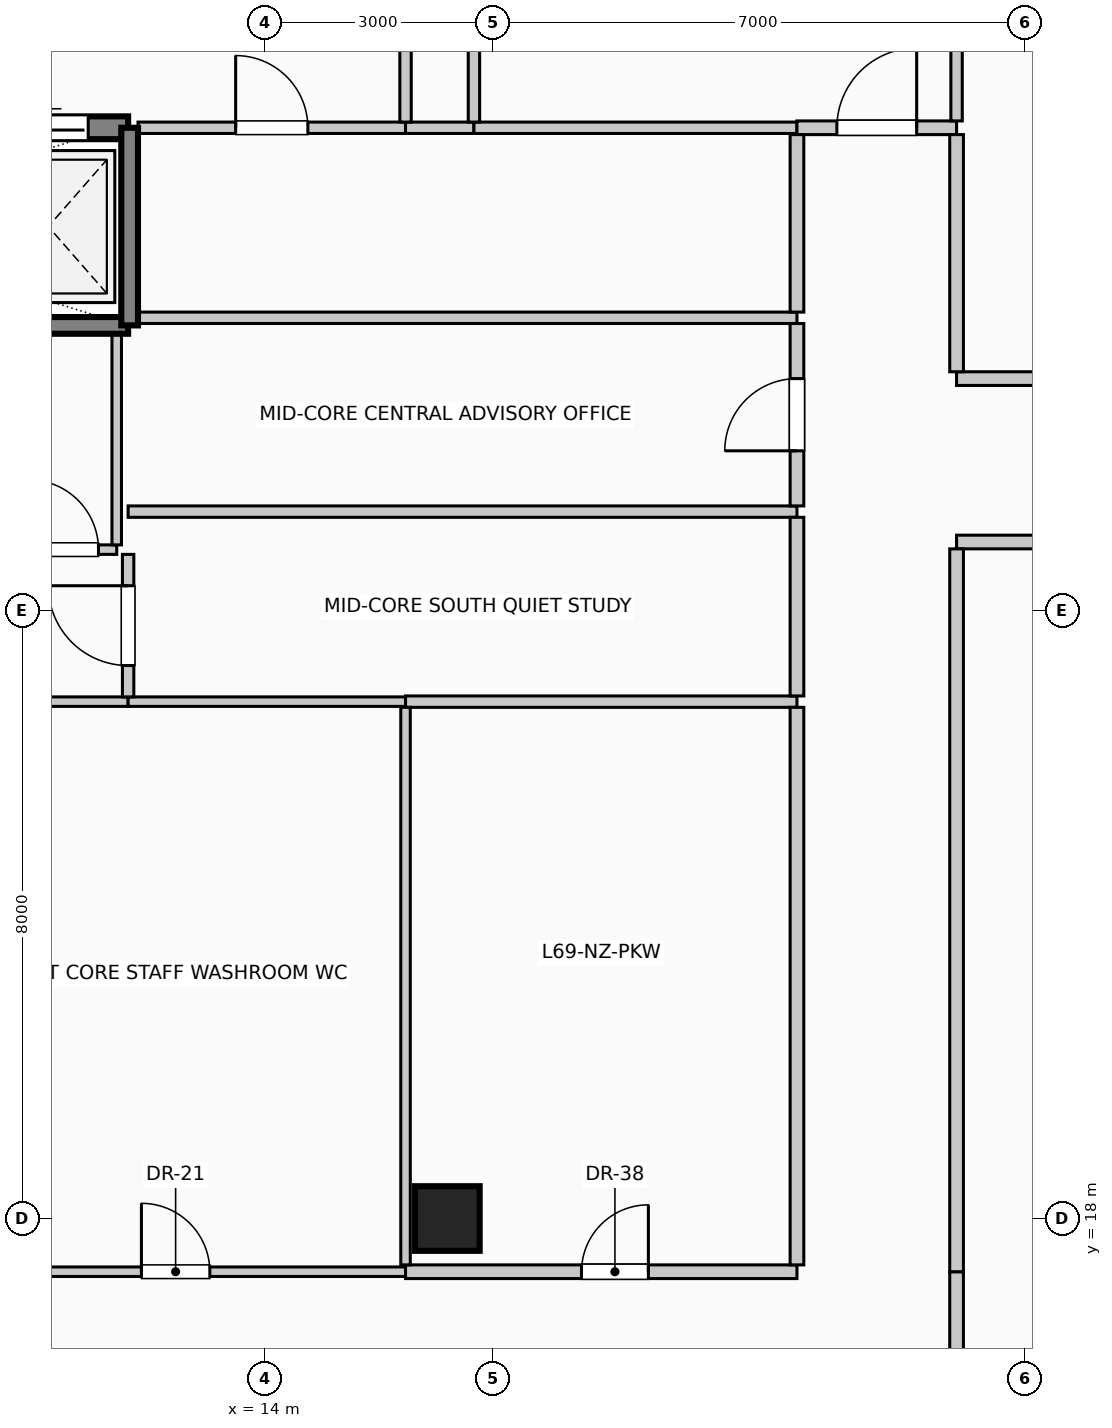
"""IFC4 building model, lengths in metres.
Left out: names, types, materials, properties, quantities, classifications, styles, units other than length and angle.
Written with IfcOpenShell. Run it as: python <this file> out.ifc"""

import sys

from ifc_helpers import new_model, si_unit, direction, frame, frame_2d, origin, origin_2d, place, context, subcontext, project, spatial, rectangle, circle, extrude, element, fill, save


model = new_model("IFC4")
c1 = context("Model", 3, precision=1e-05, world=origin(), true_north=direction((0.0, 1.0)))
c2 = subcontext(c1, "Body", "Model", "MODEL_VIEW")
j1 = project(units=[si_unit("LENGTHUNIT", "METRE"), si_unit("PLANEANGLEUNIT", "RADIAN")], contexts=[c1])
p1 = place(None, origin())
s1 = spatial("IfcSite", under=j1, at=p1, CompositionType="ELEMENT")
p2 = place(p1, origin())
s2 = spatial("IfcBuilding", under=s1, at=p2, CompositionType="ELEMENT")
p3 = place(p2, frame((0.0, 0.0, 285.0)))
s3 = spatial("IfcBuildingStorey", under=s2, at=p3, CompositionType="ELEMENT", Elevation=285.0)
p4 = place(p3, frame((16.4, 18.0, 0.0), z_axis=(0.0, 0.0, 1.0), x_axis=(1.0, 0.0, 0.0)))
e1 = element("IfcColumn", 1, at=p4, inside=s3, PredefinedType="COLUMN", context=c2, shape_type="SweptSolid", body=[
    extrude(circle(Radius=0.425, at=origin_2d()), origin(), (0.0, 0.0, 1.0), 4.0),
])
p5 = place(p3, frame((10.05, 32.35, 0.0), z_axis=(0.0, 0.0, 1.0), x_axis=(1.0, 0.0, 0.0)))
e2 = element("IfcWall", 2, at=p5, inside=s3, PredefinedType="SOLIDWALL", context=c2, shape_type="SweptSolid", body=[
    extrude(rectangle(XDim=2.15, YDim=0.3, at=frame_2d((1.075, 0.0))), origin(), (0.0, 0.0, 1.0), 4.0),
])
p6 = place(p5, frame((0.525, 0.0, 0.0)))
e3 = element("IfcOpeningElement", 3, at=p6, cuts=e2, PredefinedType="OPENING", context=c2, shape_type="SweptSolid", body=[
    extrude(rectangle(XDim=1.1, YDim=2.2, at=frame_2d((0.55, 1.1))), frame((0.0, 0.16, 0.0), z_axis=(0.0, -1.0, 0.0), x_axis=(1.0, 0.0, 0.0)), (0.0, 0.0, 1.0), 0.32),
])
p7 = place(p3, frame((3.55, 29.75, 0.0), z_axis=(0.0, 0.0, 1.0), x_axis=(1.0, 0.0, 0.0)))
e4 = element("IfcWall", 4, at=p7, inside=s3, PredefinedType="SOLIDWALL", context=c2, shape_type="SweptSolid", body=[
    extrude(rectangle(XDim=8.65, YDim=0.22, at=frame_2d((4.325, 0.0))), origin(), (0.0, 0.0, 1.0), 4.0),
])
p8 = place(p3, frame((12.22, 29.75, 0.0), z_axis=(0.0, 0.0, 1.0), x_axis=(0.0, 1.0, 0.0)))
e5 = element("IfcWall", 5, at=p8, inside=s3, PredefinedType="SOLIDWALL", context=c2, shape_type="SweptSolid", body=[
    extrude(rectangle(XDim=2.6, YDim=0.22, at=frame_2d((1.3, 0.0))), origin(), (0.0, 0.0, 1.0), 4.0),
])
p9 = place(p3, frame((9.8, 17.3, 0.0), z_axis=(0.0, 0.0, 1.0), x_axis=(1.0, 0.0, 0.0)))
e6 = element("IfcWall", 6, at=p9, inside=s3, PredefinedType="PARTITIONING", context=c2, shape_type="SweptSolid", body=[
    extrude(rectangle(XDim=6.05, YDim=0.125, at=frame_2d((3.025, 0.0))), origin(), (0.0, 0.0, 1.0), 3.775),
])
p10 = place(p9, frame((2.575, 0.0, 0.0)))
e7 = element("IfcOpeningElement", 7, at=p10, cuts=e6, PredefinedType="OPENING", context=c2, shape_type="SweptSolid", body=[
    extrude(rectangle(XDim=0.9, YDim=2.1, at=frame_2d((0.45, 1.05))), frame((0.0, 0.073, 0.0), z_axis=(0.0, -1.0, 0.0), x_axis=(1.0, 0.0, 0.0)), (0.0, 0.0, 1.0), 0.145),
])
p11 = place(p3, frame((15.85, 17.3, 0.0), z_axis=(0.0, 0.0, 1.0), x_axis=(1.0, 0.0, 0.0)))
e8 = element("IfcWall", 8, at=p11, inside=s3, PredefinedType="PARTITIONING", context=c2, shape_type="SweptSolid", body=[
    extrude(rectangle(XDim=5.15, YDim=0.18, at=frame_2d((2.575, 0.0))), origin(), (0.0, 0.0, 1.0), 3.775),
])
p12 = place(p11, frame((2.315, 0.0, 0.0)))
e9 = element("IfcOpeningElement", 9, at=p12, cuts=e8, PredefinedType="OPENING", context=c2, shape_type="SweptSolid", body=[
    extrude(rectangle(XDim=0.88, YDim=2.1, at=frame_2d((0.44, 1.05))), frame((0.0, 0.1, 0.0), z_axis=(0.0, -1.0, 0.0), x_axis=(1.0, 0.0, 0.0)), (0.0, 0.0, 1.0), 0.2),
])
p13 = place(p3, frame((9.8, 24.8, 0.0), z_axis=(0.0, 0.0, 1.0), x_axis=(1.0, 0.0, 0.0)))
e10 = element("IfcWall", 10, at=p13, inside=s3, PredefinedType="PARTITIONING", context=c2, shape_type="SweptSolid", body=[
    extrude(rectangle(XDim=2.4, YDim=0.125, at=frame_2d((1.2, 0.0))), origin(), (0.0, 0.0, 1.0), 3.775),
])
p14 = place(p3, frame((12.2, 24.8, 0.0), z_axis=(0.0, 0.0, 1.0), x_axis=(1.0, 0.0, 0.0)))
e11 = element("IfcWall", 11, at=p14, inside=s3, PredefinedType="PARTITIONING", context=c2, shape_type="SweptSolid", body=[
    extrude(rectangle(XDim=3.65, YDim=0.125, at=frame_2d((1.825, 0.0))), origin(), (0.0, 0.0, 1.0), 3.775),
])
p15 = place(p3, frame((15.85, 24.8, 0.0), z_axis=(0.0, 0.0, 1.0), x_axis=(1.0, 0.0, 0.0)))
e12 = element("IfcWall", 12, at=p15, inside=s3, PredefinedType="PARTITIONING", context=c2, shape_type="SweptSolid", body=[
    extrude(rectangle(XDim=5.15, YDim=0.15, at=frame_2d((2.575, 0.0))), origin(), (0.0, 0.0, 1.0), 3.775),
])
p16 = place(p3, frame((10.65, 26.8, 0.0), z_axis=(0.0, 0.0, 1.0), x_axis=(1.0, 0.0, 0.0)))
e13 = element("IfcWall", 13, at=p16, inside=s3, PredefinedType="PARTITIONING", context=c2, shape_type="SweptSolid", body=[
    extrude(rectangle(XDim=1.4, YDim=0.125, at=frame_2d((0.7, 0.0))), origin(), (0.0, 0.0, 1.0), 3.775),
])
p17 = place(p16, frame((0.24, 0.0, 0.0)))
e14 = element("IfcOpeningElement", 14, at=p17, cuts=e13, PredefinedType="OPENING", context=c2, shape_type="SweptSolid", body=[
    extrude(rectangle(XDim=0.92, YDim=2.1, at=frame_2d((0.46, 1.05))), frame((0.0, 0.073, 0.0), z_axis=(0.0, -1.0, 0.0), x_axis=(1.0, 0.0, 0.0)), (0.0, 0.0, 1.0), 0.145),
])
p18 = place(p3, frame((23.1, 26.9, 0.0), z_axis=(0.0, 0.0, 1.0), x_axis=(1.0, 0.0, 0.0)))
e15 = element("IfcWall", 15, at=p18, inside=s3, PredefinedType="PARTITIONING", context=c2, shape_type="SweptSolid", body=[
    extrude(rectangle(XDim=5.9, YDim=0.18, at=frame_2d((2.95, 0.0))), origin(), (0.0, 0.0, 1.0), 3.775),
])
p19 = place(p18, frame((2.51, 0.0, 0.0)))
e16 = element("IfcOpeningElement", 16, at=p19, cuts=e15, PredefinedType="OPENING", context=c2, shape_type="SweptSolid", body=[
    extrude(rectangle(XDim=0.88, YDim=2.1, at=frame_2d((0.44, 1.05))), frame((0.0, 0.1, 0.0), z_axis=(0.0, -1.0, 0.0), x_axis=(1.0, 0.0, 0.0)), (0.0, 0.0, 1.0), 0.2),
])
p20 = place(p3, frame((12.2, 27.3, 0.0), z_axis=(0.0, 0.0, 1.0), x_axis=(1.0, 0.0, 0.0)))
e17 = element("IfcWall", 17, at=p20, inside=s3, PredefinedType="PARTITIONING", context=c2, shape_type="SweptSolid", body=[
    extrude(rectangle(XDim=8.8, YDim=0.15, at=frame_2d((4.4, 0.0))), origin(), (0.0, 0.0, 1.0), 3.775),
])
p21 = place(p3, frame((23.1, 29.05, 0.0), z_axis=(0.0, 0.0, 1.0), x_axis=(1.0, 0.0, 0.0)))
e18 = element("IfcWall", 18, at=p21, inside=s3, PredefinedType="PARTITIONING", context=c2, shape_type="SweptSolid", body=[
    extrude(rectangle(XDim=5.24, YDim=0.18, at=frame_2d((2.62, 0.0))), origin(), (0.0, 0.0, 1.0), 3.775),
])
p22 = place(p21, frame((2.18, 0.0, 0.0)))
e19 = element("IfcOpeningElement", 19, at=p22, cuts=e18, PredefinedType="OPENING", context=c2, shape_type="SweptSolid", body=[
    extrude(rectangle(XDim=0.88, YDim=2.1, at=frame_2d((0.44, 1.05))), frame((0.0, 0.1, 0.0), z_axis=(0.0, -1.0, 0.0), x_axis=(1.0, 0.0, 0.0)), (0.0, 0.0, 1.0), 0.2),
])
p23 = place(p3, frame((12.33, 29.85, 0.0), z_axis=(0.0, 0.0, 1.0), x_axis=(1.0, 0.0, 0.0)))
e20 = element("IfcWall", 20, at=p23, inside=s3, PredefinedType="PARTITIONING", context=c2, shape_type="SweptSolid", body=[
    extrude(rectangle(XDim=8.67, YDim=0.15, at=frame_2d((4.335, 0.0))), origin(), (0.0, 0.0, 1.0), 3.775),
])
p24 = place(p3, frame((12.33, 32.35, 0.0), z_axis=(0.0, 0.0, 1.0), x_axis=(1.0, 0.0, 0.0)))
e21 = element("IfcWall", 21, at=p24, inside=s3, PredefinedType="PARTITIONING", context=c2, shape_type="SweptSolid", body=[
    extrude(rectangle(XDim=3.52, YDim=0.15, at=frame_2d((1.76, 0.0))), origin(), (0.0, 0.0, 1.0), 3.775),
])
p25 = place(p24, frame((1.285, 0.0, 0.0)))
e22 = element("IfcOpeningElement", 22, at=p25, cuts=e21, PredefinedType="OPENING", context=c2, shape_type="SweptSolid", body=[
    extrude(rectangle(XDim=0.95, YDim=2.15, at=frame_2d((0.475, 1.075))), frame((0.0, 0.085, 0.0), z_axis=(0.0, -1.0, 0.0), x_axis=(1.0, 0.0, 0.0)), (0.0, 0.0, 1.0), 0.17),
])
p26 = place(p3, frame((15.85, 32.35, 0.0), z_axis=(0.0, 0.0, 1.0), x_axis=(1.0, 0.0, 0.0)))
e23 = element("IfcWall", 23, at=p26, inside=s3, PredefinedType="PARTITIONING", context=c2, shape_type="SweptSolid", body=[
    extrude(rectangle(XDim=0.9, YDim=0.15, at=frame_2d((0.45, 0.0))), origin(), (0.0, 0.0, 1.0), 3.775),
])
p27 = place(p3, frame((16.75, 32.35, 0.0), z_axis=(0.0, 0.0, 1.0), x_axis=(1.0, 0.0, 0.0)))
e24 = element("IfcWall", 24, at=p27, inside=s3, PredefinedType="PARTITIONING", context=c2, shape_type="SweptSolid", body=[
    extrude(rectangle(XDim=4.25, YDim=0.15, at=frame_2d((2.125, 0.0))), origin(), (0.0, 0.0, 1.0), 3.775),
])
p28 = place(p3, frame((21.0, 32.35, 0.0), z_axis=(0.0, 0.0, 1.0), x_axis=(1.0, 0.0, 0.0)))
e25 = element("IfcWall", 25, at=p28, inside=s3, PredefinedType="PARTITIONING", context=c2, shape_type="SweptSolid", body=[
    extrude(rectangle(XDim=2.1, YDim=0.18, at=frame_2d((1.05, 0.0))), origin(), (0.0, 0.0, 1.0), 3.775),
])
p29 = place(p28, frame((0.525, 0.0, 0.0)))
e26 = element("IfcOpeningElement", 26, at=p29, cuts=e25, PredefinedType="OPENING", context=c2, shape_type="SweptSolid", body=[
    extrude(rectangle(XDim=1.05, YDim=2.15, at=frame_2d((0.525, 1.075))), frame((0.0, 0.1, 0.0), z_axis=(0.0, -1.0, 0.0), x_axis=(1.0, 0.0, 0.0)), (0.0, 0.0, 1.0), 0.2),
])
p30 = place(p3, frame((12.05, 26.863, 0.0), z_axis=(0.0, 0.0, 1.0), x_axis=(0.0, 1.0, 0.0)))
e27 = element("IfcWall", 27, at=p30, inside=s3, PredefinedType="PARTITIONING", context=c2, shape_type="SweptSolid", body=[
    extrude(rectangle(XDim=2.777, YDim=0.125, at=frame_2d((1.389, 0.0))), origin(), (0.0, 0.0, 1.0), 3.775),
])
p31 = place(p3, frame((12.2, 24.863, 0.0), z_axis=(0.0, 0.0, 1.0), x_axis=(0.0, 1.0, 0.0)))
e28 = element("IfcWall", 28, at=p31, inside=s3, PredefinedType="PARTITIONING", context=c2, shape_type="SweptSolid", body=[
    extrude(rectangle(XDim=1.875, YDim=0.15, at=frame_2d((0.938, 0.0))), origin(), (0.0, 0.0, 1.0), 3.775),
])
p32 = place(p31, frame((0.413, 0.0, 0.0)))
e29 = element("IfcOpeningElement", 29, at=p32, cuts=e28, PredefinedType="OPENING", context=c2, shape_type="SweptSolid", body=[
    extrude(rectangle(XDim=1.05, YDim=2.15, at=frame_2d((0.525, 1.075))), frame((0.0, 0.085, 0.0), z_axis=(0.0, -1.0, 0.0), x_axis=(1.0, 0.0, 0.0)), (0.0, 0.0, 1.0), 0.17),
])
p33 = place(p3, frame((15.85, 17.39, 0.0), z_axis=(0.0, 0.0, 1.0), x_axis=(0.0, 1.0, 0.0)))
e30 = element("IfcWall", 30, at=p33, inside=s3, PredefinedType="PARTITIONING", context=c2, shape_type="SweptSolid", body=[
    extrude(rectangle(XDim=7.335, YDim=0.125, at=frame_2d((3.667, 0.0))), origin(), (0.0, 0.0, 1.0), 3.775),
])
p34 = place(p3, frame((15.85, 32.425, 0.0), z_axis=(0.0, 0.0, 1.0), x_axis=(0.0, 1.0, 0.0)))
e31 = element("IfcWall", 31, at=p34, inside=s3, PredefinedType="PARTITIONING", context=c2, shape_type="SweptSolid", body=[
    extrude(rectangle(XDim=1.725, YDim=0.15, at=frame_2d((0.862, 0.0))), origin(), (0.0, 0.0, 1.0), 3.775),
])
p35 = place(p3, frame((16.75, 32.425, 0.0), z_axis=(0.0, 0.0, 1.0), x_axis=(0.0, 1.0, 0.0)))
e32 = element("IfcWall", 32, at=p35, inside=s3, PredefinedType="PARTITIONING", context=c2, shape_type="SweptSolid", body=[
    extrude(rectangle(XDim=1.15, YDim=0.15, at=frame_2d((0.575, 0.0))), origin(), (0.0, 0.0, 1.0), 3.775),
])
p36 = place(p3, frame((21.0, 17.39, 0.0), z_axis=(0.0, 0.0, 1.0), x_axis=(0.0, 1.0, 0.0)))
e33 = element("IfcWall", 33, at=p36, inside=s3, PredefinedType="PARTITIONING", context=c2, shape_type="SweptSolid", body=[
    extrude(rectangle(XDim=7.335, YDim=0.18, at=frame_2d((3.667, 0.0))), origin(), (0.0, 0.0, 1.0), 3.775),
])
p37 = place(p3, frame((21.0, 24.875, 0.0), z_axis=(0.0, 0.0, 1.0), x_axis=(0.0, 1.0, 0.0)))
e34 = element("IfcWall", 34, at=p37, inside=s3, PredefinedType="PARTITIONING", context=c2, shape_type="SweptSolid", body=[
    extrude(rectangle(XDim=2.35, YDim=0.18, at=frame_2d((1.175, 0.0))), origin(), (0.0, 0.0, 1.0), 3.775),
])
p38 = place(p3, frame((21.0, 27.375, 0.0), z_axis=(0.0, 0.0, 1.0), x_axis=(0.0, 1.0, 0.0)))
e35 = element("IfcWall", 35, at=p38, inside=s3, PredefinedType="PARTITIONING", context=c2, shape_type="SweptSolid", body=[
    extrude(rectangle(XDim=2.4, YDim=0.18, at=frame_2d((1.2, 0.0))), origin(), (0.0, 0.0, 1.0), 3.775),
])
p39 = place(p38, frame((0.725, 0.0, 0.0)))
e36 = element("IfcOpeningElement", 36, at=p39, cuts=e35, PredefinedType="OPENING", context=c2, shape_type="SweptSolid", body=[
    extrude(rectangle(XDim=0.95, YDim=2.15, at=frame_2d((0.475, 1.075))), frame((0.0, 0.1, 0.0), z_axis=(0.0, -1.0, 0.0), x_axis=(1.0, 0.0, 0.0)), (0.0, 0.0, 1.0), 0.2),
])
p40 = place(p3, frame((21.0, 29.925, 0.0), z_axis=(0.0, 0.0, 1.0), x_axis=(0.0, 1.0, 0.0)))
e37 = element("IfcWall", 37, at=p40, inside=s3, PredefinedType="PARTITIONING", context=c2, shape_type="SweptSolid", body=[
    extrude(rectangle(XDim=2.335, YDim=0.18, at=frame_2d((1.167, 0.0))), origin(), (0.0, 0.0, 1.0), 3.775),
])
p41 = place(p3, frame((23.1, 15.29, 0.0), z_axis=(0.0, 0.0, 1.0), x_axis=(0.0, 1.0, 0.0)))
e38 = element("IfcWall", 38, at=p41, inside=s3, PredefinedType="PARTITIONING", context=c2, shape_type="SweptSolid", body=[
    extrude(rectangle(XDim=2.01, YDim=0.18, at=frame_2d((1.005, 0.0))), origin(), (0.0, 0.0, 1.0), 3.775),
])
p42 = place(p3, frame((23.1, 17.3, 0.0), z_axis=(0.0, 0.0, 1.0), x_axis=(0.0, 1.0, 0.0)))
e39 = element("IfcWall", 39, at=p42, inside=s3, PredefinedType="PARTITIONING", context=c2, shape_type="SweptSolid", body=[
    extrude(rectangle(XDim=9.51, YDim=0.18, at=frame_2d((4.755, 0.0))), origin(), (0.0, 0.0, 1.0), 3.775),
])
p43 = place(p3, frame((23.1, 29.14, 0.0), z_axis=(0.0, 0.0, 1.0), x_axis=(0.0, 1.0, 0.0)))
e40 = element("IfcWall", 40, at=p43, inside=s3, PredefinedType="PARTITIONING", context=c2, shape_type="SweptSolid", body=[
    extrude(rectangle(XDim=3.12, YDim=0.18, at=frame_2d((1.56, 0.0))), origin(), (0.0, 0.0, 1.0), 3.775),
])
p44 = place(p3, frame((23.1, 32.44, 0.0), z_axis=(0.0, 0.0, 1.0), x_axis=(0.0, 1.0, 0.0)))
e41 = element("IfcWall", 41, at=p44, inside=s3, PredefinedType="PARTITIONING", context=c2, shape_type="SweptSolid", body=[
    extrude(rectangle(XDim=12.84, YDim=0.15, at=frame_2d((6.42, 0.0))), origin(), (0.0, 0.0, 1.0), 3.775),
])
p45 = place(p6, origin())
e42 = element("IfcDoor", 42, at=p45, inside=s3, OperationType="SLIDING_TO_RIGHT", PredefinedType="DOOR", context=c2, shape_type="SweptSolid", body=[
    extrude(rectangle(XDim=1.1, YDim=2.2, at=frame_2d((0.55, 1.1))), frame((0.0, 0.025, 0.0), z_axis=(0.0, -1.0, 0.0), x_axis=(1.0, 0.0, 0.0)), (0.0, 0.0, 1.0), 0.05),
])
fill(e3, e42)
p46 = place(p10, origin())
e43 = element("IfcDoor", 43, at=p46, inside=s3, OperationType="SINGLE_SWING_LEFT", PredefinedType="DOOR", context=c2, shape_type="SweptSolid", body=[
    extrude(rectangle(XDim=0.9, YDim=2.1, at=frame_2d((0.45, 1.05))), frame((0.0, 0.025, 0.0), z_axis=(0.0, -1.0, 0.0), x_axis=(1.0, 0.0, 0.0)), (0.0, 0.0, 1.0), 0.05),
])
fill(e7, e43)
p47 = place(p12, origin())
e44 = element("IfcDoor", 44, at=p47, inside=s3, OperationType="SINGLE_SWING_RIGHT", PredefinedType="DOOR", context=c2, shape_type="SweptSolid", body=[
    extrude(rectangle(XDim=0.88, YDim=2.1, at=frame_2d((0.44, 1.05))), frame((0.0, 0.025, 0.0), z_axis=(0.0, -1.0, 0.0), x_axis=(1.0, 0.0, 0.0)), (0.0, 0.0, 1.0), 0.05),
])
fill(e9, e44)
p48 = place(p17, origin())
e45 = element("IfcDoor", 45, at=p48, inside=s3, OperationType="SINGLE_SWING_LEFT", PredefinedType="DOOR", context=c2, shape_type="SweptSolid", body=[
    extrude(rectangle(XDim=0.92, YDim=2.1, at=frame_2d((0.46, 1.05))), frame((0.0, 0.025, 0.0), z_axis=(0.0, -1.0, 0.0), x_axis=(1.0, 0.0, 0.0)), (0.0, 0.0, 1.0), 0.05),
])
fill(e14, e45)
p49 = place(p25, origin())
e46 = element("IfcDoor", 46, at=p49, inside=s3, OperationType="SINGLE_SWING_LEFT", PredefinedType="DOOR", context=c2, shape_type="SweptSolid", body=[
    extrude(rectangle(XDim=0.95, YDim=2.15, at=frame_2d((0.475, 1.075))), frame((0.0, 0.025, 0.0), z_axis=(0.0, -1.0, 0.0), x_axis=(1.0, 0.0, 0.0)), (0.0, 0.0, 1.0), 0.05),
])
fill(e22, e46)
p50 = place(p29, origin())
e47 = element("IfcDoor", 47, at=p50, inside=s3, OperationType="SINGLE_SWING_RIGHT", PredefinedType="DOOR", context=c2, shape_type="SweptSolid", body=[
    extrude(rectangle(XDim=1.05, YDim=2.15, at=frame_2d((0.525, 1.075))), frame((0.0, 0.025, 0.0), z_axis=(0.0, -1.0, 0.0), x_axis=(1.0, 0.0, 0.0)), (0.0, 0.0, 1.0), 0.05),
])
fill(e26, e47)
p51 = place(p32, origin())
e48 = element("IfcDoor", 48, at=p51, inside=s3, OperationType="SINGLE_SWING_RIGHT", PredefinedType="DOOR", context=c2, shape_type="SweptSolid", body=[
    extrude(rectangle(XDim=1.05, YDim=2.15, at=frame_2d((0.525, 1.075))), frame((0.0, 0.025, 0.0), z_axis=(0.0, -1.0, 0.0), x_axis=(1.0, 0.0, 0.0)), (0.0, 0.0, 1.0), 0.05),
])
fill(e29, e48)
p52 = place(p39, origin())
e49 = element("IfcDoor", 49, at=p52, inside=s3, OperationType="SINGLE_SWING_LEFT", PredefinedType="DOOR", context=c2, shape_type="SweptSolid", body=[
    extrude(rectangle(XDim=0.95, YDim=2.15, at=frame_2d((0.475, 1.075))), frame((0.0, 0.025, 0.0), z_axis=(0.0, -1.0, 0.0), x_axis=(1.0, 0.0, 0.0)), (0.0, 0.0, 1.0), 0.05),
])
fill(e36, e49)
save(model, sys.argv[1])
